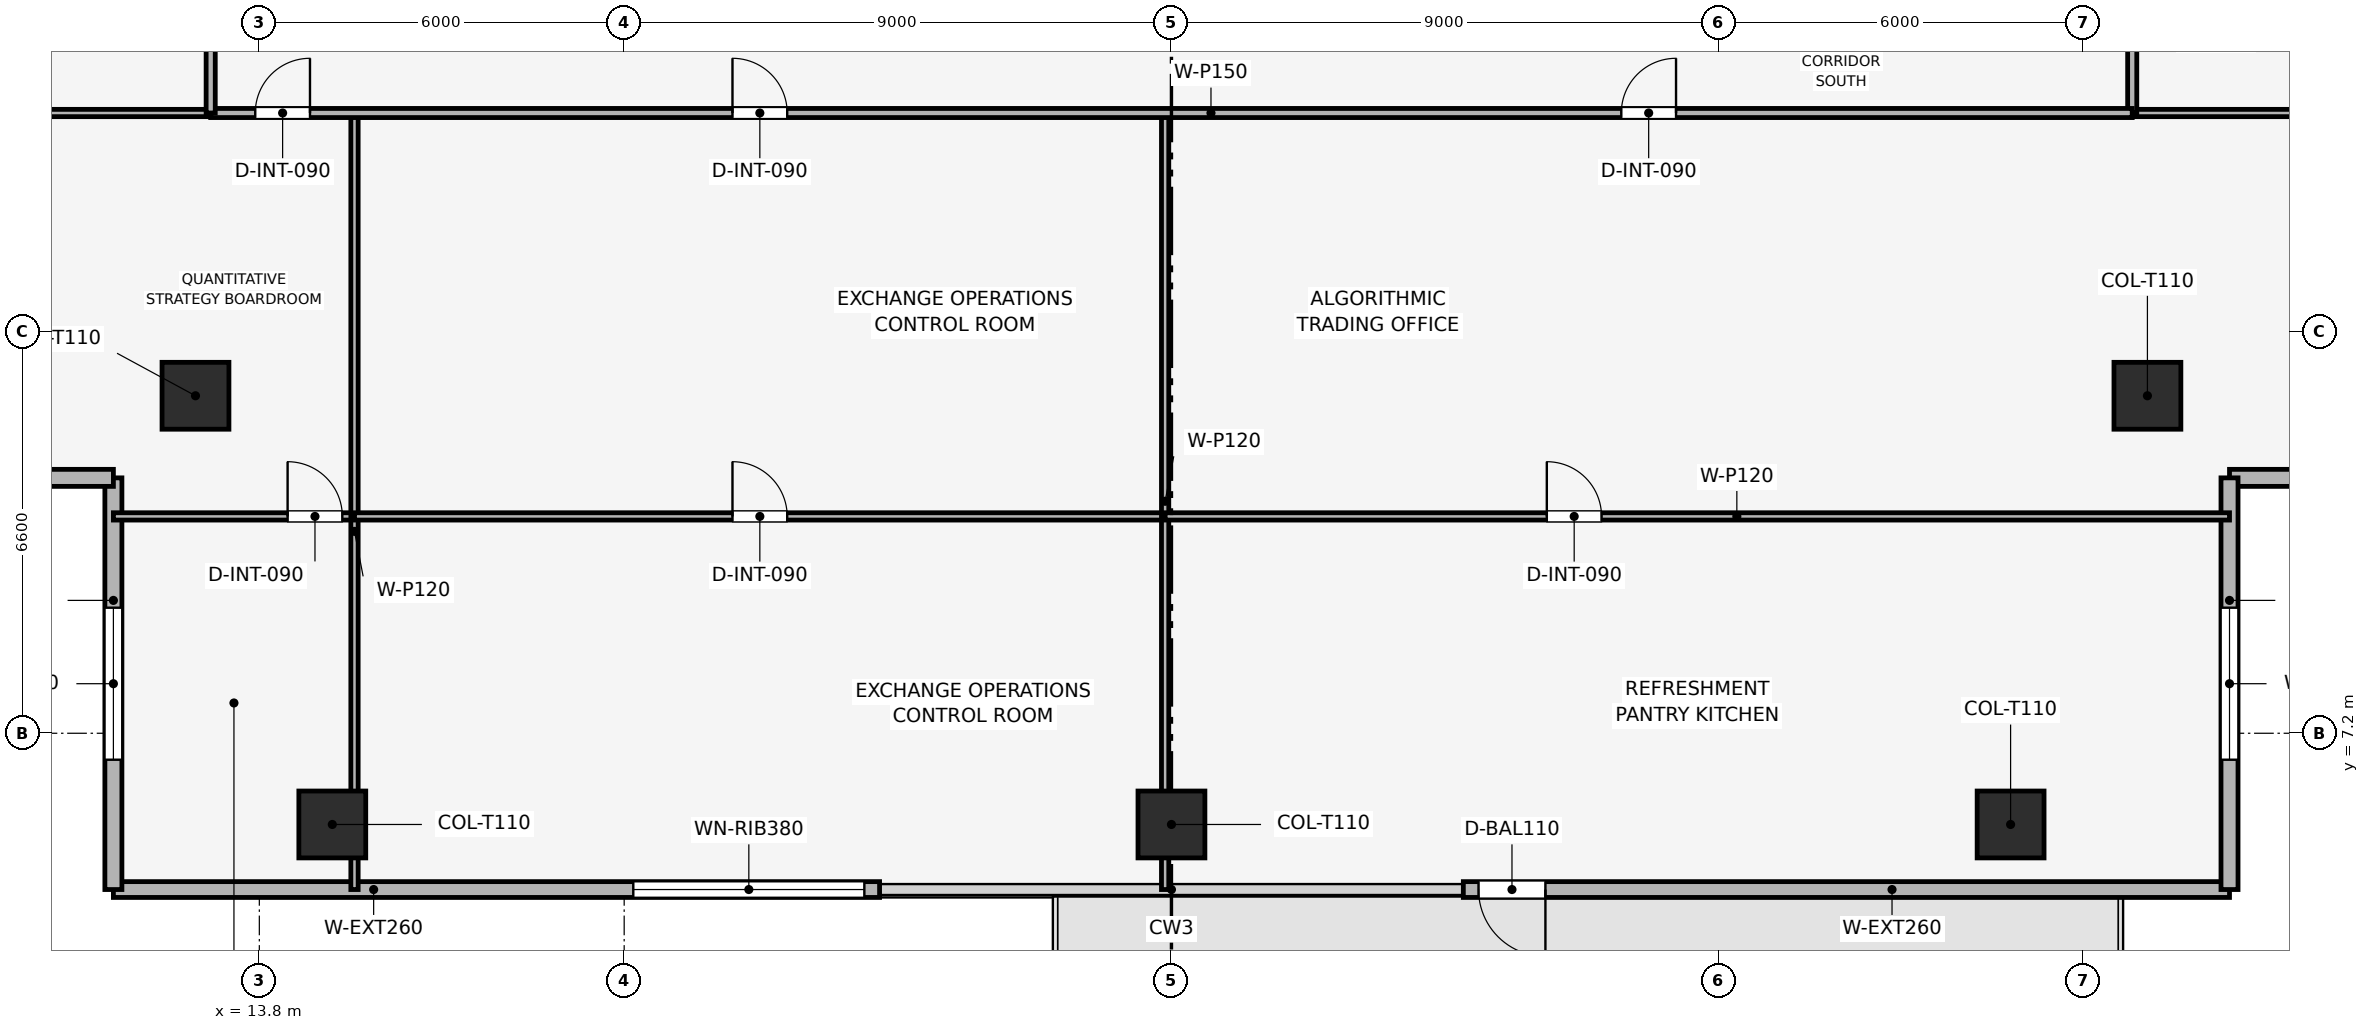
"""IFC4 building model, lengths in metres.
Left out: names, types, materials, properties, quantities, classifications, styles, units other than length and angle.
Written with IfcOpenShell. Run it as: python <this file> out.ifc"""

import sys

from ifc_helpers import new_model, si_unit, direction, frame, frame_2d, origin, origin_2d, place, context, subcontext, project, spatial, rectangle, extrude, element, fill, save


model = new_model("IFC4")
c1 = context("Model", 3, precision=1e-05, world=origin(), true_north=direction((0.0, 1.0)))
c2 = subcontext(c1, "Body", "Model", "MODEL_VIEW")
j1 = project(units=[si_unit("LENGTHUNIT", "METRE"), si_unit("PLANEANGLEUNIT", "RADIAN")], contexts=[c1])
p1 = place(None, origin())
s1 = spatial("IfcSite", under=j1, at=p1, CompositionType="ELEMENT")
p2 = place(p1, origin())
s2 = spatial("IfcBuilding", under=s1, at=p2, CompositionType="ELEMENT")
p3 = place(p2, frame((0.0, 0.0, 179.55)))
s3 = spatial("IfcBuildingStorey", under=s2, at=p3, CompositionType="ELEMENT", Elevation=179.55)
for number, where, z_axis, x_axis in (
    (1, (15.0, 5.7, 0.003), (0.0, 0.0, 1.0), (1.0, 0.0, 0.0)),
    (2, (28.8, 5.7, 0.003), (0.0, 0.0, 1.0), (1.0, 0.0, 0.0)),
    (3, (42.6, 5.7, 0.003), (0.0, 0.0, 1.0), (1.0, 0.0, 0.0)),
    (4, (12.75, 12.75, 0.003), (0.0, 0.0, 1.0), (1.0, 0.0, 0.0)),
    (5, (44.85, 12.75, 0.003), (0.0, 0.0, 1.0), (1.0, 0.0, 0.0)),
):
    element("IfcColumn", number, at=place(p3, frame(where, z_axis=z_axis, x_axis=x_axis)), inside=s3, PredefinedType="COLUMN", context=c2, shape_type="SweptSolid", body=[
        extrude(rectangle(XDim=1.1, YDim=1.1, at=origin_2d()), origin(), (0.0, 0.0, 1.0), 3.489),
    ])
p4 = place(p3, frame((46.2, 4.63, 0.0), z_axis=(0.0, 0.0, 1.0), x_axis=(-1.0, 0.0, 0.0)))
e6 = element("IfcWall", 6, at=p4, inside=s3, PredefinedType="SOLIDWALL", context=c2, shape_type="SweptSolid", body=[
    extrude(rectangle(XDim=12.6, YDim=0.26, at=frame_2d((6.3, 0.0))), origin(), (0.0, 0.0, 1.0), 3.495),
])
p5 = place(p4, frame((11.25, 0.0, 0.0)))
e7 = element("IfcOpeningElement", 7, at=p5, cuts=e6, PredefinedType="OPENING", context=c2, shape_type="SweptSolid", body=[
    extrude(rectangle(XDim=1.1, YDim=2.2, at=frame_2d((0.55, 1.1))), frame((0.0, 0.14, 0.0), z_axis=(0.0, -1.0, 0.0), x_axis=(1.0, 0.0, 0.0)), (0.0, 0.0, 1.0), 0.28),
])
p6 = place(p3, frame((24.0, 4.63, 0.0), z_axis=(0.0, 0.0, 1.0), x_axis=(-1.0, 0.0, 0.0)))
e8 = element("IfcWall", 8, at=p6, inside=s3, PredefinedType="SOLIDWALL", context=c2, shape_type="SweptSolid", body=[
    extrude(rectangle(XDim=12.6, YDim=0.26, at=frame_2d((6.3, 0.0))), origin(), (0.0, 0.0, 1.0), 3.495),
])
p7 = place(p6, frame((0.25, 0.0, 0.9)))
e9 = element("IfcOpeningElement", 9, at=p7, cuts=e8, PredefinedType="OPENING", context=c2, shape_type="SweptSolid", body=[
    extrude(rectangle(XDim=3.8, YDim=1.9, at=frame_2d((1.9, 0.95))), frame((0.0, 0.14, 0.0), z_axis=(0.0, -1.0, 0.0), x_axis=(1.0, 0.0, 0.0)), (0.0, 0.0, 1.0), 0.28),
])
p8 = place(p3, frame((11.4, 4.63, 0.0), z_axis=(0.0, 0.0, 1.0), x_axis=(0.0, 1.0, 0.0)))
e10 = element("IfcWall", 10, at=p8, inside=s3, PredefinedType="SOLIDWALL", context=c2, shape_type="SweptSolid", body=[
    extrude(rectangle(XDim=6.77, YDim=0.28, at=frame_2d((3.385, 0.0))), origin(), (0.0, 0.0, 1.0), 3.495),
])
p9 = place(p8, frame((2.135, 0.0, 0.9)))
e11 = element("IfcOpeningElement", 11, at=p9, cuts=e10, PredefinedType="OPENING", context=c2, shape_type="SweptSolid", body=[
    extrude(rectangle(XDim=2.5, YDim=1.9, at=frame_2d((1.25, 0.95))), frame((0.0, 0.15, 0.0), z_axis=(0.0, -1.0, 0.0), x_axis=(1.0, 0.0, 0.0)), (0.0, 0.0, 1.0), 0.3),
])
p10 = place(p3, frame((11.4, 11.4, 0.0), z_axis=(0.0, 0.0, 1.0), x_axis=(-1.0, 0.0, 0.0)))
e12 = element("IfcWall", 12, at=p10, inside=s3, PredefinedType="SOLIDWALL", context=c2, shape_type="SweptSolid", body=[
    extrude(rectangle(XDim=6.77, YDim=0.28, at=frame_2d((3.385, 0.0))), origin(), (0.0, 0.0, 1.0), 3.495),
])
p11 = place(p10, frame((2.135, 0.0, 0.9)))
e13 = element("IfcOpeningElement", 13, at=p11, cuts=e12, PredefinedType="OPENING", context=c2, shape_type="SweptSolid", body=[
    extrude(rectangle(XDim=2.5, YDim=1.9, at=frame_2d((1.25, 0.95))), frame((0.0, 0.15, 0.0), z_axis=(0.0, -1.0, 0.0), x_axis=(1.0, 0.0, 0.0)), (0.0, 0.0, 1.0), 0.3),
])
p12 = place(p3, frame((52.97, 11.4, 0.0), z_axis=(0.0, 0.0, 1.0), x_axis=(-1.0, 0.0, 0.0)))
e14 = element("IfcWall", 14, at=p12, inside=s3, PredefinedType="SOLIDWALL", context=c2, shape_type="SweptSolid", body=[
    extrude(rectangle(XDim=6.77, YDim=0.28, at=frame_2d((3.385, 0.0))), origin(), (0.0, 0.0, 1.0), 3.495),
])
p13 = place(p12, frame((2.135, 0.0, 0.9)))
e15 = element("IfcOpeningElement", 15, at=p13, cuts=e14, PredefinedType="OPENING", context=c2, shape_type="SweptSolid", body=[
    extrude(rectangle(XDim=2.5, YDim=1.9, at=frame_2d((1.25, 0.95))), frame((0.0, 0.15, 0.0), z_axis=(0.0, -1.0, 0.0), x_axis=(1.0, 0.0, 0.0)), (0.0, 0.0, 1.0), 0.3),
])
p14 = place(p3, frame((46.2, 11.4, 0.0), z_axis=(0.0, 0.0, 1.0), x_axis=(0.0, -1.0, 0.0)))
e16 = element("IfcWall", 16, at=p14, inside=s3, PredefinedType="SOLIDWALL", context=c2, shape_type="SweptSolid", body=[
    extrude(rectangle(XDim=6.77, YDim=0.28, at=frame_2d((3.385, 0.0))), origin(), (0.0, 0.0, 1.0), 3.495),
])
p15 = place(p14, frame((2.135, 0.0, 0.9)))
e17 = element("IfcOpeningElement", 17, at=p15, cuts=e16, PredefinedType="OPENING", context=c2, shape_type="SweptSolid", body=[
    extrude(rectangle(XDim=2.5, YDim=1.9, at=frame_2d((1.25, 0.95))), frame((0.0, 0.15, 0.0), z_axis=(0.0, -1.0, 0.0), x_axis=(1.0, 0.0, 0.0)), (0.0, 0.0, 1.0), 0.3),
])
p16 = place(p3, frame((11.4, 10.766, 0.0), z_axis=(0.0, 0.0, 1.0), x_axis=(1.0, 0.0, 0.0)))
e18 = element("IfcWall", 18, at=p16, inside=s3, PredefinedType="PARTITIONING", context=c2, shape_type="SweptSolid", body=[
    extrude(rectangle(XDim=3.965, YDim=0.12, at=frame_2d((1.982, 0.0))), origin(), (0.0, 0.0, 1.0), 2.98),
])
p17 = place(p16, frame((2.865, 0.0, 0.0)))
e19 = element("IfcOpeningElement", 19, at=p17, cuts=e18, PredefinedType="OPENING", context=c2, shape_type="SweptSolid", body=[
    extrude(rectangle(XDim=0.9, YDim=2.1, at=frame_2d((0.45, 1.05))), frame((0.0, 0.07, 0.0), z_axis=(0.0, -1.0, 0.0), x_axis=(1.0, 0.0, 0.0)), (0.0, 0.0, 1.0), 0.14),
])
p18 = place(p3, frame((15.365, 4.63, 0.0), z_axis=(0.0, 0.0, 1.0), x_axis=(0.0, 1.0, 0.0)))
e20 = element("IfcWall", 20, at=p18, inside=s3, PredefinedType="PARTITIONING", context=c2, shape_type="SweptSolid", body=[
    extrude(rectangle(XDim=12.77, YDim=0.12, at=frame_2d((6.385, 0.0))), origin(), (0.0, 0.0, 1.0), 2.98),
])
p19 = place(p3, frame((15.365, 10.766, 0.0), z_axis=(0.0, 0.0, 1.0), x_axis=(1.0, 0.0, 0.0)))
e21 = element("IfcWall", 21, at=p19, inside=s3, PredefinedType="PARTITIONING", context=c2, shape_type="SweptSolid", body=[
    extrude(rectangle(XDim=13.331, YDim=0.12, at=frame_2d((6.666, 0.0))), origin(), (0.0, 0.0, 1.0), 3.03),
])
p20 = place(p19, frame((6.216, 0.0, 0.0)))
e22 = element("IfcOpeningElement", 22, at=p20, cuts=e21, PredefinedType="OPENING", context=c2, shape_type="SweptSolid", body=[
    extrude(rectangle(XDim=0.9, YDim=2.1, at=frame_2d((0.45, 1.05))), frame((0.0, 0.07, 0.0), z_axis=(0.0, -1.0, 0.0), x_axis=(1.0, 0.0, 0.0)), (0.0, 0.0, 1.0), 0.14),
])
p21 = place(p3, frame((28.696, 4.63, 0.0), z_axis=(0.0, 0.0, 1.0), x_axis=(0.0, 1.0, 0.0)))
e23 = element("IfcWall", 23, at=p21, inside=s3, PredefinedType="PARTITIONING", context=c2, shape_type="SweptSolid", body=[
    extrude(rectangle(XDim=12.77, YDim=0.12, at=frame_2d((6.385, 0.0))), origin(), (0.0, 0.0, 1.0), 2.98),
])
p22 = place(p3, frame((28.696, 10.766, 0.0), z_axis=(0.0, 0.0, 1.0), x_axis=(1.0, 0.0, 0.0)))
e24 = element("IfcWall", 24, at=p22, inside=s3, PredefinedType="PARTITIONING", context=c2, shape_type="SweptSolid", body=[
    extrude(rectangle(XDim=17.504, YDim=0.12, at=frame_2d((8.752, 0.0))), origin(), (0.0, 0.0, 1.0), 2.98),
])
p23 = place(p22, frame((6.277, 0.0, 0.0)))
e25 = element("IfcOpeningElement", 25, at=p23, cuts=e24, PredefinedType="OPENING", context=c2, shape_type="SweptSolid", body=[
    extrude(rectangle(XDim=0.9, YDim=2.1, at=frame_2d((0.45, 1.05))), frame((0.0, 0.07, 0.0), z_axis=(0.0, -1.0, 0.0), x_axis=(1.0, 0.0, 0.0)), (0.0, 0.0, 1.0), 0.14),
])
p24 = place(p3, frame((4.63, 17.4, 0.0), z_axis=(0.0, 0.0, 1.0), x_axis=(1.0, 0.0, 0.0)))
e26 = element("IfcWall", 26, at=p24, inside=s3, PredefinedType="PARTITIONING", context=c2, shape_type="SweptSolid", body=[
    extrude(rectangle(XDim=8.37, YDim=0.12, at=frame_2d((4.185, 0.0))), origin(), (0.0, 0.0, 1.0), 2.98),
])
p25 = place(p3, frame((44.6, 17.4, 0.0), z_axis=(0.0, 0.0, 1.0), x_axis=(1.0, 0.0, 0.0)))
e27 = element("IfcWall", 27, at=p25, inside=s3, PredefinedType="PARTITIONING", context=c2, shape_type="SweptSolid", body=[
    extrude(rectangle(XDim=8.37, YDim=0.12, at=frame_2d((4.185, 0.0))), origin(), (0.0, 0.0, 1.0), 2.98),
])
p26 = place(p3, frame((44.6, 17.4, 0.0), z_axis=(0.0, 0.0, 1.0), x_axis=(0.0, 1.0, 0.0)))
e28 = element("IfcWall", 28, at=p26, inside=s3, PredefinedType="PARTITIONING", context=c2, shape_type="SweptSolid", body=[
    extrude(rectangle(XDim=2.4, YDim=0.15, at=frame_2d((1.2, 0.0))), origin(), (0.0, 0.0, 1.0), 3.495),
])
p27 = place(p3, frame((13.0, 17.4, 0.0), z_axis=(0.0, 0.0, 1.0), x_axis=(1.0, 0.0, 0.0)))
e29 = element("IfcWall", 29, at=p27, inside=s3, PredefinedType="PARTITIONING", context=c2, shape_type="SweptSolid", body=[
    extrude(rectangle(XDim=31.6, YDim=0.15, at=frame_2d((15.8, 0.0))), origin(), (0.0, 0.0, 1.0), 3.03),
])
p28 = place(p27, frame((0.733, 0.0, 0.0)))
e30 = element("IfcOpeningElement", 30, at=p28, cuts=e29, PredefinedType="OPENING", context=c2, shape_type="SweptSolid", body=[
    extrude(rectangle(XDim=0.9, YDim=2.1, at=frame_2d((0.45, 1.05))), frame((0.0, 0.085, 0.0), z_axis=(0.0, -1.0, 0.0), x_axis=(1.0, 0.0, 0.0)), (0.0, 0.0, 1.0), 0.17),
])
p29 = place(p27, frame((8.581, 0.0, 0.0)))
e31 = element("IfcOpeningElement", 31, at=p29, cuts=e29, PredefinedType="OPENING", context=c2, shape_type="SweptSolid", body=[
    extrude(rectangle(XDim=0.9, YDim=2.1, at=frame_2d((0.45, 1.05))), frame((0.0, 0.085, 0.0), z_axis=(0.0, -1.0, 0.0), x_axis=(1.0, 0.0, 0.0)), (0.0, 0.0, 1.0), 0.17),
])
p30 = place(p27, frame((23.198, 0.0, 0.0)))
e32 = element("IfcOpeningElement", 32, at=p30, cuts=e29, PredefinedType="OPENING", context=c2, shape_type="SweptSolid", body=[
    extrude(rectangle(XDim=0.9, YDim=2.1, at=frame_2d((0.45, 1.05))), frame((0.0, 0.085, 0.0), z_axis=(0.0, -1.0, 0.0), x_axis=(1.0, 0.0, 0.0)), (0.0, 0.0, 1.0), 0.17),
])
p31 = place(p3, frame((13.0, 17.4, 0.0), z_axis=(0.0, 0.0, 1.0), x_axis=(0.0, 1.0, 0.0)))
e33 = element("IfcWall", 33, at=p31, inside=s3, PredefinedType="PARTITIONING", context=c2, shape_type="SweptSolid", body=[
    extrude(rectangle(XDim=22.8, YDim=0.15, at=frame_2d((11.4, 0.0))), origin(), (0.0, 0.0, 1.0), 3.03),
])
p32 = place(p31, frame((3.113, 0.0, 0.0)))
e34 = element("IfcOpeningElement", 34, at=p32, cuts=e33, PredefinedType="OPENING", context=c2, shape_type="SweptSolid", body=[
    extrude(rectangle(XDim=0.9, YDim=2.1, at=frame_2d((0.45, 1.05))), frame((0.0, 0.085, 0.0), z_axis=(0.0, -1.0, 0.0), x_axis=(1.0, 0.0, 0.0)), (0.0, 0.0, 1.0), 0.17),
])
p33 = place(p31, frame((7.542, 0.0, 0.0)))
e35 = element("IfcOpeningElement", 35, at=p33, cuts=e33, PredefinedType="OPENING", context=c2, shape_type="SweptSolid", body=[
    extrude(rectangle(XDim=0.9, YDim=2.1, at=frame_2d((0.45, 1.05))), frame((0.0, 0.085, 0.0), z_axis=(0.0, -1.0, 0.0), x_axis=(1.0, 0.0, 0.0)), (0.0, 0.0, 1.0), 0.17),
])
p34 = place(p31, frame((15.378, 0.0, 0.0)))
e36 = element("IfcOpeningElement", 36, at=p34, cuts=e33, PredefinedType="OPENING", context=c2, shape_type="SweptSolid", body=[
    extrude(rectangle(XDim=0.9, YDim=2.1, at=frame_2d((0.45, 1.05))), frame((0.0, 0.085, 0.0), z_axis=(0.0, -1.0, 0.0), x_axis=(1.0, 0.0, 0.0)), (0.0, 0.0, 1.0), 0.17),
])
p35 = place(p5, origin())
e37 = element("IfcDoor", 37, at=p35, inside=s3, OperationType="SINGLE_SWING_LEFT", PredefinedType="DOOR", context=c2, shape_type="SweptSolid", body=[
    extrude(rectangle(XDim=1.1, YDim=2.2, at=frame_2d((0.55, 1.1))), frame((0.0, 0.025, 0.0), z_axis=(0.0, -1.0, 0.0), x_axis=(1.0, 0.0, 0.0)), (0.0, 0.0, 1.0), 0.05),
])
fill(e7, e37)
p36 = place(p7, origin())
e38 = element("IfcWindow", 38, at=p36, inside=s3, PartitioningType="SINGLE_PANEL", PredefinedType="WINDOW", context=c2, shape_type="SweptSolid", body=[
    extrude(rectangle(XDim=3.8, YDim=1.9, at=frame_2d((1.9, 0.95))), frame((0.0, 0.03, 0.0), z_axis=(0.0, -1.0, 0.0), x_axis=(1.0, 0.0, 0.0)), (0.0, 0.0, 1.0), 0.06),
])
fill(e9, e38)
p37 = place(p9, origin())
e39 = element("IfcWindow", 39, at=p37, inside=s3, PartitioningType="SINGLE_PANEL", PredefinedType="WINDOW", context=c2, shape_type="SweptSolid", body=[
    extrude(rectangle(XDim=2.5, YDim=1.9, at=frame_2d((1.25, 0.95))), frame((0.0, 0.03, 0.0), z_axis=(0.0, -1.0, 0.0), x_axis=(1.0, 0.0, 0.0)), (0.0, 0.0, 1.0), 0.06),
])
fill(e11, e39)
p38 = place(p15, origin())
e40 = element("IfcWindow", 40, at=p38, inside=s3, PartitioningType="SINGLE_PANEL", PredefinedType="WINDOW", context=c2, shape_type="SweptSolid", body=[
    extrude(rectangle(XDim=2.5, YDim=1.9, at=frame_2d((1.25, 0.95))), frame((0.0, 0.03, 0.0), z_axis=(0.0, -1.0, 0.0), x_axis=(1.0, 0.0, 0.0)), (0.0, 0.0, 1.0), 0.06),
])
fill(e17, e40)
p39 = place(p17, origin())
e41 = element("IfcDoor", 41, at=p39, inside=s3, OperationType="SINGLE_SWING_LEFT", PredefinedType="DOOR", context=c2, shape_type="SweptSolid", body=[
    extrude(rectangle(XDim=0.9, YDim=2.1, at=frame_2d((0.45, 1.05))), frame((0.0, 0.025, 0.0), z_axis=(0.0, -1.0, 0.0), x_axis=(1.0, 0.0, 0.0)), (0.0, 0.0, 1.0), 0.05),
])
fill(e19, e41)
p40 = place(p20, origin())
e42 = element("IfcDoor", 42, at=p40, inside=s3, OperationType="SINGLE_SWING_LEFT", PredefinedType="DOOR", context=c2, shape_type="SweptSolid", body=[
    extrude(rectangle(XDim=0.9, YDim=2.1, at=frame_2d((0.45, 1.05))), frame((0.0, 0.025, 0.0), z_axis=(0.0, -1.0, 0.0), x_axis=(1.0, 0.0, 0.0)), (0.0, 0.0, 1.0), 0.05),
])
fill(e22, e42)
p41 = place(p23, origin())
e43 = element("IfcDoor", 43, at=p41, inside=s3, OperationType="SINGLE_SWING_LEFT", PredefinedType="DOOR", context=c2, shape_type="SweptSolid", body=[
    extrude(rectangle(XDim=0.9, YDim=2.1, at=frame_2d((0.45, 1.05))), frame((0.0, 0.025, 0.0), z_axis=(0.0, -1.0, 0.0), x_axis=(1.0, 0.0, 0.0)), (0.0, 0.0, 1.0), 0.05),
])
fill(e25, e43)
p42 = place(p28, origin())
e44 = element("IfcDoor", 44, at=p42, inside=s3, OperationType="SINGLE_SWING_RIGHT", PredefinedType="DOOR", context=c2, shape_type="SweptSolid", body=[
    extrude(rectangle(XDim=0.9, YDim=2.1, at=frame_2d((0.45, 1.05))), frame((0.0, 0.025, 0.0), z_axis=(0.0, -1.0, 0.0), x_axis=(1.0, 0.0, 0.0)), (0.0, 0.0, 1.0), 0.05),
])
fill(e30, e44)
p43 = place(p29, origin())
e45 = element("IfcDoor", 45, at=p43, inside=s3, OperationType="SINGLE_SWING_LEFT", PredefinedType="DOOR", context=c2, shape_type="SweptSolid", body=[
    extrude(rectangle(XDim=0.9, YDim=2.1, at=frame_2d((0.45, 1.05))), frame((0.0, 0.025, 0.0), z_axis=(0.0, -1.0, 0.0), x_axis=(1.0, 0.0, 0.0)), (0.0, 0.0, 1.0), 0.05),
])
fill(e31, e45)
p44 = place(p30, origin())
e46 = element("IfcDoor", 46, at=p44, inside=s3, OperationType="SINGLE_SWING_RIGHT", PredefinedType="DOOR", context=c2, shape_type="SweptSolid", body=[
    extrude(rectangle(XDim=0.9, YDim=2.1, at=frame_2d((0.45, 1.05))), frame((0.0, 0.025, 0.0), z_axis=(0.0, -1.0, 0.0), x_axis=(1.0, 0.0, 0.0)), (0.0, 0.0, 1.0), 0.05),
])
fill(e32, e46)
save(model, sys.argv[1])
